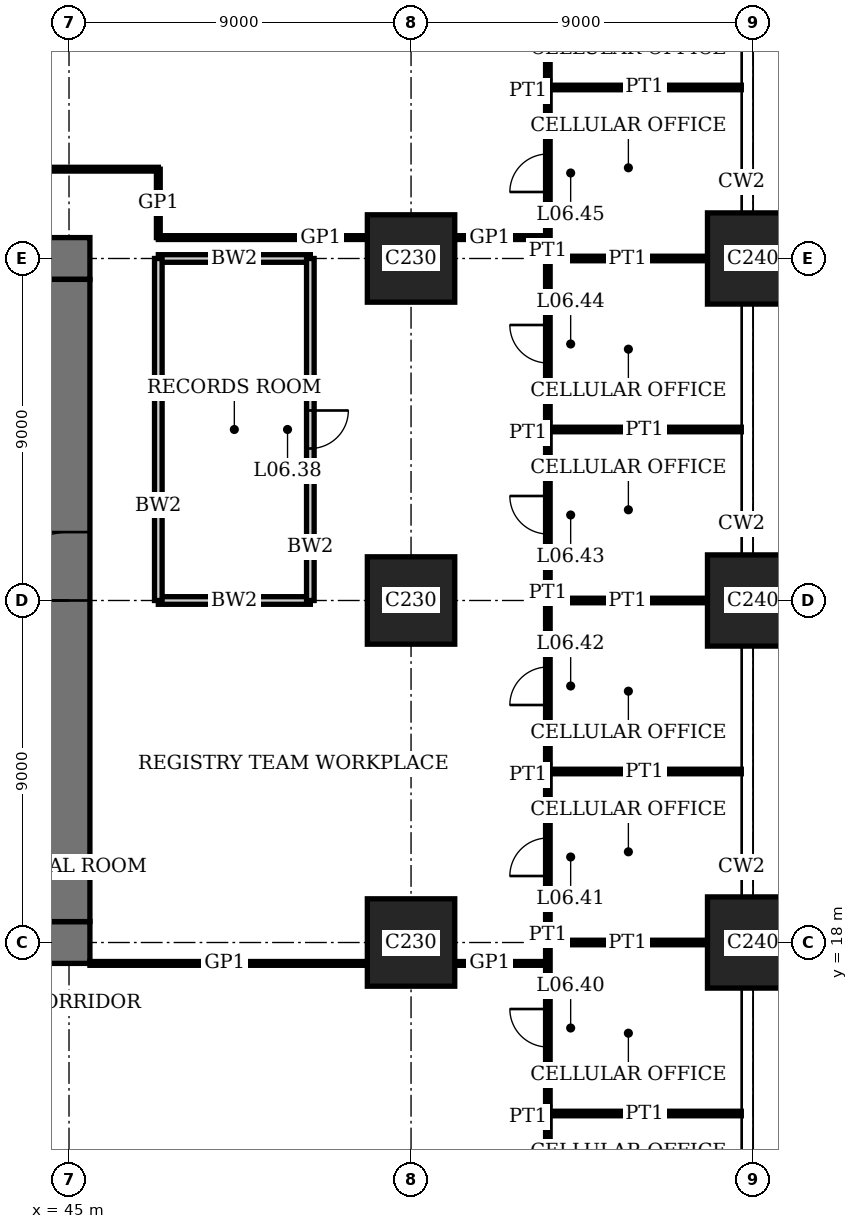
"""IFC4 building model, lengths in metres.
Left out: names, types, materials, properties, quantities, classifications, styles, units other than length and angle.
Written with IfcOpenShell. Run it as: python <this file> out.ifc"""

import sys

from ifc_helpers import new_model, si_unit, direction, frame, frame_2d, origin, origin_2d, place, context, subcontext, project, spatial, rectangle, extrude, element, fill, save


model = new_model("IFC4")
c1 = context("Model", 3, precision=1e-05, world=origin(), true_north=direction((0.0, 1.0)))
c2 = subcontext(c1, "Body", "Model", "MODEL_VIEW")
j1 = project(units=[si_unit("LENGTHUNIT", "METRE"), si_unit("PLANEANGLEUNIT", "RADIAN")], contexts=[c1])
p1 = place(None, origin())
s1 = spatial("IfcSite", under=j1, at=p1, CompositionType="ELEMENT")
p2 = place(p1, origin())
s2 = spatial("IfcBuilding", under=s1, at=p2, CompositionType="ELEMENT")
p3 = place(p2, frame((0.0, 0.0, 27.8)))
s3 = spatial("IfcBuildingStorey", under=s2, at=p3, CompositionType="ELEMENT", Elevation=27.8)
for number, where, z_axis, x_axis in (
    (1, (54.0, 18.0, 0.0), (0.0, 0.0, 1.0), (1.0, 0.0, 0.0)),
    (2, (54.0, 27.0, 0.0), (0.0, 0.0, 1.0), (1.0, 0.0, 0.0)),
    (3, (54.0, 36.0, 0.0), (0.0, 0.0, 1.0), (1.0, 0.0, 0.0)),
):
    element("IfcColumn", number, at=place(p3, frame(where, z_axis=z_axis, x_axis=x_axis)), inside=s3, PredefinedType="COLUMN", context=c2, shape_type="SweptSolid", body=[
        extrude(rectangle(XDim=2.3, YDim=2.3, at=origin_2d()), origin(), (0.0, 0.0, 1.0), 4.0),
    ])
for number, where, z_axis, x_axis in (
    (4, (63.0, 18.0, 0.0), (0.0, 0.0, 1.0), (1.0, 0.0, 0.0)),
    (5, (63.0, 27.0, 0.0), (0.0, 0.0, 1.0), (1.0, 0.0, 0.0)),
    (6, (63.0, 36.0, 0.0), (0.0, 0.0, 1.0), (1.0, 0.0, 0.0)),
):
    element("IfcColumn", number, at=place(p3, frame(where, z_axis=z_axis, x_axis=x_axis)), inside=s3, PredefinedType="COLUMN", context=c2, shape_type="SweptSolid", body=[
        extrude(rectangle(XDim=2.4, YDim=2.4, at=origin_2d()), origin(), (0.0, 0.0, 1.0), 4.0),
    ])
p4 = place(p3, frame((17.45, 18.0, 0.0), z_axis=(0.0, 0.0, 1.0), x_axis=(1.0, 0.0, 0.0)))
e7 = element("IfcWall", 7, at=p4, inside=s3, PredefinedType="SHEAR", context=c2, shape_type="SweptSolid", body=[
    extrude(rectangle(XDim=28.1, YDim=1.1, at=frame_2d((14.05, 0.0))), origin(), (0.0, 0.0, 1.0), 4.0),
])
p5 = place(p4, frame((11.55, 0.0, 0.0)))
e8 = element("IfcOpeningElement", 8, at=p5, cuts=e7, PredefinedType="OPENING", context=c2, shape_type="SweptSolid", body=[
    extrude(rectangle(XDim=1.0, YDim=2.4, at=frame_2d((0.5, 1.2))), frame((0.0, 0.56, 0.0), z_axis=(0.0, -1.0, 0.0), x_axis=(1.0, 0.0, 0.0)), (0.0, 0.0, 1.0), 1.12),
])
p6 = place(p4, frame((16.55, 0.0, 0.0)))
e9 = element("IfcOpeningElement", 9, at=p6, cuts=e7, PredefinedType="OPENING", context=c2, shape_type="SweptSolid", body=[
    extrude(rectangle(XDim=1.0, YDim=2.4, at=frame_2d((0.5, 1.2))), frame((0.0, 0.56, 0.0), z_axis=(0.0, -1.0, 0.0), x_axis=(1.0, 0.0, 0.0)), (0.0, 0.0, 1.0), 1.12),
])
p7 = place(p4, frame((20.0, 0.0, 0.0)))
e10 = element("IfcOpeningElement", 10, at=p7, cuts=e7, PredefinedType="OPENING", context=c2, shape_type="SweptSolid", body=[
    extrude(rectangle(XDim=1.1, YDim=2.4, at=frame_2d((0.55, 1.2))), frame((0.0, 0.56, 0.0), z_axis=(0.0, -1.0, 0.0), x_axis=(1.0, 0.0, 0.0)), (0.0, 0.0, 1.0), 1.12),
])
p8 = place(p4, frame((24.05, 0.0, 0.0)))
e11 = element("IfcOpeningElement", 11, at=p8, cuts=e7, PredefinedType="OPENING", context=c2, shape_type="SweptSolid", body=[
    extrude(rectangle(XDim=1.0, YDim=2.4, at=frame_2d((0.5, 1.2))), frame((0.0, 0.56, 0.0), z_axis=(0.0, -1.0, 0.0), x_axis=(1.0, 0.0, 0.0)), (0.0, 0.0, 1.0), 1.12),
])
p9 = place(p3, frame((45.55, 36.0, 0.0), z_axis=(0.0, 0.0, 1.0), x_axis=(-1.0, 0.0, 0.0)))
e12 = element("IfcWall", 12, at=p9, inside=s3, PredefinedType="SHEAR", context=c2, shape_type="SweptSolid", body=[
    extrude(rectangle(XDim=28.1, YDim=1.1, at=frame_2d((14.05, 0.0))), origin(), (0.0, 0.0, 1.0), 4.0),
])
p10 = place(p9, frame((11.55, 0.0, 0.0)))
e13 = element("IfcOpeningElement", 13, at=p10, cuts=e12, PredefinedType="OPENING", context=c2, shape_type="SweptSolid", body=[
    extrude(rectangle(XDim=1.0, YDim=2.4, at=frame_2d((0.5, 1.2))), frame((0.0, 0.56, 0.0), z_axis=(0.0, -1.0, 0.0), x_axis=(1.0, 0.0, 0.0)), (0.0, 0.0, 1.0), 1.12),
])
p11 = place(p9, frame((16.55, 0.0, 0.0)))
e14 = element("IfcOpeningElement", 14, at=p11, cuts=e12, PredefinedType="OPENING", context=c2, shape_type="SweptSolid", body=[
    extrude(rectangle(XDim=1.0, YDim=2.4, at=frame_2d((0.5, 1.2))), frame((0.0, 0.56, 0.0), z_axis=(0.0, -1.0, 0.0), x_axis=(1.0, 0.0, 0.0)), (0.0, 0.0, 1.0), 1.12),
])
p12 = place(p9, frame((20.0, 0.0, 0.0)))
e15 = element("IfcOpeningElement", 15, at=p12, cuts=e12, PredefinedType="OPENING", context=c2, shape_type="SweptSolid", body=[
    extrude(rectangle(XDim=1.1, YDim=2.4, at=frame_2d((0.55, 1.2))), frame((0.0, 0.56, 0.0), z_axis=(0.0, -1.0, 0.0), x_axis=(1.0, 0.0, 0.0)), (0.0, 0.0, 1.0), 1.12),
])
p13 = place(p9, frame((24.05, 0.0, 0.0)))
e16 = element("IfcOpeningElement", 16, at=p13, cuts=e12, PredefinedType="OPENING", context=c2, shape_type="SweptSolid", body=[
    extrude(rectangle(XDim=1.0, YDim=2.4, at=frame_2d((0.5, 1.2))), frame((0.0, 0.56, 0.0), z_axis=(0.0, -1.0, 0.0), x_axis=(1.0, 0.0, 0.0)), (0.0, 0.0, 1.0), 1.12),
])
p14 = place(p3, frame((45.0, 18.55, 0.0), z_axis=(0.0, 0.0, 1.0), x_axis=(0.0, 1.0, 0.0)))
e17 = element("IfcWall", 17, at=p14, inside=s3, PredefinedType="SHEAR", context=c2, shape_type="SweptSolid", body=[
    extrude(rectangle(XDim=16.9, YDim=1.1, at=frame_2d((8.45, 0.0))), origin(), (0.0, 0.0, 1.0), 4.0),
])
p15 = place(p14, frame((8.45, 0.0, 0.0)))
e18 = element("IfcOpeningElement", 18, at=p15, cuts=e17, PredefinedType="OPENING", context=c2, shape_type="SweptSolid", body=[
    extrude(rectangle(XDim=1.8, YDim=2.4, at=frame_2d((0.9, 1.2))), frame((0.0, 0.56, 0.0), z_axis=(0.0, -1.0, 0.0), x_axis=(1.0, 0.0, 0.0)), (0.0, 0.0, 1.0), 1.12),
])
p16 = place(p3, frame((57.6, 13.5, 0.0), z_axis=(0.0, 0.0, 1.0), x_axis=(1.0, 0.0, 0.0)))
e19 = element("IfcWall", 19, at=p16, inside=s3, PredefinedType="PARTITIONING", context=c2, shape_type="SweptSolid", body=[
    extrude(rectangle(XDim=5.09, YDim=0.12, at=frame_2d((2.545, 0.0))), origin(), (0.0, 0.0, 1.0), 3.1),
])
p17 = place(p3, frame((45.55, 17.45, 0.0), z_axis=(0.0, 0.0, 1.0), x_axis=(1.0, 0.0, 0.0)))
e20 = element("IfcWall", 20, at=p17, inside=s3, PredefinedType="PARTITIONING", context=c2, shape_type="SweptSolid", body=[
    extrude(rectangle(XDim=7.3, YDim=0.1, at=frame_2d((3.65, 0.0))), origin(), (0.0, 0.0, 1.0), 3.75),
])
p18 = place(p3, frame((55.15, 17.45, 0.0), z_axis=(0.0, 0.0, 1.0), x_axis=(1.0, 0.0, 0.0)))
e21 = element("IfcWall", 21, at=p18, inside=s3, PredefinedType="PARTITIONING", context=c2, shape_type="SweptSolid", body=[
    extrude(rectangle(XDim=2.46, YDim=0.1, at=frame_2d((1.23, 0.0))), origin(), (0.0, 0.0, 1.0), 3.75),
])
p19 = place(p3, frame((57.6, 18.0, 0.0), z_axis=(0.0, 0.0, 1.0), x_axis=(1.0, 0.0, 0.0)))
e22 = element("IfcWall", 22, at=p19, inside=s3, PredefinedType="PARTITIONING", context=c2, shape_type="SweptSolid", body=[
    extrude(rectangle(XDim=4.2, YDim=0.12, at=frame_2d((2.1, 0.0))), origin(), (0.0, 0.0, 1.0), 3.05),
])
p20 = place(p3, frame((57.6, 22.5, 0.0), z_axis=(0.0, 0.0, 1.0), x_axis=(1.0, 0.0, 0.0)))
e23 = element("IfcWall", 23, at=p20, inside=s3, PredefinedType="PARTITIONING", context=c2, shape_type="SweptSolid", body=[
    extrude(rectangle(XDim=5.09, YDim=0.12, at=frame_2d((2.545, 0.0))), origin(), (0.0, 0.0, 1.0), 3.1),
])
p21 = place(p3, frame((47.35, 27.0, 0.0), z_axis=(0.0, 0.0, 1.0), x_axis=(1.0, 0.0, 0.0)))
e24 = element("IfcWall", 24, at=p21, inside=s3, PredefinedType="SOLIDWALL", context=c2, shape_type="SweptSolid", body=[
    extrude(rectangle(XDim=4.0, YDim=0.2, at=frame_2d((2.0, 0.0))), origin(), (0.0, 0.0, 1.0), 3.05),
])
p22 = place(p3, frame((57.6, 27.0, 0.0), z_axis=(0.0, 0.0, 1.0), x_axis=(1.0, 0.0, 0.0)))
e25 = element("IfcWall", 25, at=p22, inside=s3, PredefinedType="PARTITIONING", context=c2, shape_type="SweptSolid", body=[
    extrude(rectangle(XDim=4.2, YDim=0.12, at=frame_2d((2.1, 0.0))), origin(), (0.0, 0.0, 1.0), 3.05),
])
p23 = place(p3, frame((57.6, 31.5, 0.0), z_axis=(0.0, 0.0, 1.0), x_axis=(1.0, 0.0, 0.0)))
e26 = element("IfcWall", 26, at=p23, inside=s3, PredefinedType="PARTITIONING", context=c2, shape_type="SweptSolid", body=[
    extrude(rectangle(XDim=5.09, YDim=0.12, at=frame_2d((2.545, 0.0))), origin(), (0.0, 0.0, 1.0), 3.1),
])
p24 = place(p3, frame((47.35, 36.0, 0.0), z_axis=(0.0, 0.0, 1.0), x_axis=(1.0, 0.0, 0.0)))
e27 = element("IfcWall", 27, at=p24, inside=s3, PredefinedType="SOLIDWALL", context=c2, shape_type="SweptSolid", body=[
    extrude(rectangle(XDim=4.0, YDim=0.2, at=frame_2d((2.0, 0.0))), origin(), (0.0, 0.0, 1.0), 3.05),
])
p25 = place(p3, frame((57.6, 36.0, 0.0), z_axis=(0.0, 0.0, 1.0), x_axis=(1.0, 0.0, 0.0)))
e28 = element("IfcWall", 28, at=p25, inside=s3, PredefinedType="PARTITIONING", context=c2, shape_type="SweptSolid", body=[
    extrude(rectangle(XDim=4.2, YDim=0.12, at=frame_2d((2.1, 0.0))), origin(), (0.0, 0.0, 1.0), 3.05),
])
p26 = place(p3, frame((47.35, 36.55, 0.0), z_axis=(0.0, 0.0, 1.0), x_axis=(1.0, 0.0, 0.0)))
e29 = element("IfcWall", 29, at=p26, inside=s3, PredefinedType="PARTITIONING", context=c2, shape_type="SweptSolid", body=[
    extrude(rectangle(XDim=5.5, YDim=0.1, at=frame_2d((2.75, 0.0))), origin(), (0.0, 0.0, 1.0), 3.75),
])
p27 = place(p3, frame((55.15, 36.55, 0.0), z_axis=(0.0, 0.0, 1.0), x_axis=(1.0, 0.0, 0.0)))
e30 = element("IfcWall", 30, at=p27, inside=s3, PredefinedType="PARTITIONING", context=c2, shape_type="SweptSolid", body=[
    extrude(rectangle(XDim=2.46, YDim=0.1, at=frame_2d((1.23, 0.0))), origin(), (0.0, 0.0, 1.0), 3.75),
])
p28 = place(p3, frame((15.65, 38.35, 0.0), z_axis=(0.0, 0.0, 1.0), x_axis=(1.0, 0.0, 0.0)))
e31 = element("IfcWall", 31, at=p28, inside=s3, PredefinedType="PARTITIONING", context=c2, shape_type="SweptSolid", body=[
    extrude(rectangle(XDim=31.7, YDim=0.1, at=frame_2d((15.85, 0.0))), origin(), (0.0, 0.0, 1.0), 3.75),
])
p29 = place(p28, frame((15.35, 0.0, 0.0)))
e32 = element("IfcOpeningElement", 32, at=p29, cuts=e31, PredefinedType="OPENING", context=c2, shape_type="SweptSolid", body=[
    extrude(rectangle(XDim=1.0, YDim=2.4, at=frame_2d((0.5, 1.2))), frame((0.0, 0.06, 0.0), z_axis=(0.0, -1.0, 0.0), x_axis=(1.0, 0.0, 0.0)), (0.0, 0.0, 1.0), 0.12),
])
p30 = place(p3, frame((57.6, 40.5, 0.0), z_axis=(0.0, 0.0, 1.0), x_axis=(1.0, 0.0, 0.0)))
e33 = element("IfcWall", 33, at=p30, inside=s3, PredefinedType="PARTITIONING", context=c2, shape_type="SweptSolid", body=[
    extrude(rectangle(XDim=5.09, YDim=0.12, at=frame_2d((2.545, 0.0))), origin(), (0.0, 0.0, 1.0), 3.1),
])
p31 = place(p3, frame((47.35, 27.0, 0.0), z_axis=(0.0, 0.0, 1.0), x_axis=(0.0, 1.0, 0.0)))
e34 = element("IfcWall", 34, at=p31, inside=s3, PredefinedType="SOLIDWALL", context=c2, shape_type="SweptSolid", body=[
    extrude(rectangle(XDim=9.0, YDim=0.2, at=frame_2d((4.5, 0.0))), origin(), (0.0, 0.0, 1.0), 3.75),
])
p32 = place(p3, frame((47.35, 36.55, 0.0), z_axis=(0.0, 0.0, 1.0), x_axis=(0.0, 1.0, 0.0)))
e35 = element("IfcWall", 35, at=p32, inside=s3, PredefinedType="PARTITIONING", context=c2, shape_type="SweptSolid", body=[
    extrude(rectangle(XDim=1.8, YDim=0.1, at=frame_2d((0.9, 0.0))), origin(), (0.0, 0.0, 1.0), 3.75),
])
p33 = place(p3, frame((51.35, 27.0, 0.0), z_axis=(0.0, 0.0, 1.0), x_axis=(0.0, 1.0, 0.0)))
e36 = element("IfcWall", 36, at=p33, inside=s3, PredefinedType="SOLIDWALL", context=c2, shape_type="SweptSolid", body=[
    extrude(rectangle(XDim=9.0, YDim=0.2, at=frame_2d((4.5, 0.0))), origin(), (0.0, 0.0, 1.0), 3.75),
])
p34 = place(p33, frame((4.0, 0.0, 0.0)))
e37 = element("IfcOpeningElement", 37, at=p34, cuts=e36, PredefinedType="OPENING", context=c2, shape_type="SweptSolid", body=[
    extrude(rectangle(XDim=1.0, YDim=2.4, at=frame_2d((0.5, 1.2))), frame((0.0, 0.11, 0.0), z_axis=(0.0, -1.0, 0.0), x_axis=(1.0, 0.0, 0.0)), (0.0, 0.0, 1.0), 0.22),
])
p35 = place(p3, frame((57.6, 9.0, 0.0), z_axis=(0.0, 0.0, 1.0), x_axis=(0.0, 1.0, 0.0)))
e38 = element("IfcWall", 38, at=p35, inside=s3, PredefinedType="PARTITIONING", context=c2, shape_type="SweptSolid", body=[
    extrude(rectangle(XDim=4.5, YDim=0.12, at=frame_2d((2.25, 0.0))), origin(), (0.0, 0.0, 1.0), 3.75),
])
p36 = place(p35, frame((1.75, 0.0, 0.0)))
e39 = element("IfcOpeningElement", 39, at=p36, cuts=e38, PredefinedType="OPENING", context=c2, shape_type="SweptSolid", body=[
    extrude(rectangle(XDim=1.0, YDim=2.4, at=frame_2d((0.5, 1.2))), frame((0.0, 0.07, 0.0), z_axis=(0.0, -1.0, 0.0), x_axis=(1.0, 0.0, 0.0)), (0.0, 0.0, 1.0), 0.14),
])
p37 = place(p3, frame((57.6, 13.5, 0.0), z_axis=(0.0, 0.0, 1.0), x_axis=(0.0, 1.0, 0.0)))
e40 = element("IfcWall", 40, at=p37, inside=s3, PredefinedType="PARTITIONING", context=c2, shape_type="SweptSolid", body=[
    extrude(rectangle(XDim=4.5, YDim=0.12, at=frame_2d((2.25, 0.0))), origin(), (0.0, 0.0, 1.0), 3.75),
])
p38 = place(p37, frame((1.75, 0.0, 0.0)))
e41 = element("IfcOpeningElement", 41, at=p38, cuts=e40, PredefinedType="OPENING", context=c2, shape_type="SweptSolid", body=[
    extrude(rectangle(XDim=1.0, YDim=2.4, at=frame_2d((0.5, 1.2))), frame((0.0, 0.07, 0.0), z_axis=(0.0, -1.0, 0.0), x_axis=(1.0, 0.0, 0.0)), (0.0, 0.0, 1.0), 0.14),
])
p39 = place(p3, frame((57.6, 18.0, 0.0), z_axis=(0.0, 0.0, 1.0), x_axis=(0.0, 1.0, 0.0)))
e42 = element("IfcWall", 42, at=p39, inside=s3, PredefinedType="PARTITIONING", context=c2, shape_type="SweptSolid", body=[
    extrude(rectangle(XDim=4.5, YDim=0.12, at=frame_2d((2.25, 0.0))), origin(), (0.0, 0.0, 1.0), 3.75),
])
p40 = place(p39, frame((1.75, 0.0, 0.0)))
e43 = element("IfcOpeningElement", 43, at=p40, cuts=e42, PredefinedType="OPENING", context=c2, shape_type="SweptSolid", body=[
    extrude(rectangle(XDim=1.0, YDim=2.4, at=frame_2d((0.5, 1.2))), frame((0.0, 0.07, 0.0), z_axis=(0.0, -1.0, 0.0), x_axis=(1.0, 0.0, 0.0)), (0.0, 0.0, 1.0), 0.14),
])
p41 = place(p3, frame((57.6, 22.5, 0.0), z_axis=(0.0, 0.0, 1.0), x_axis=(0.0, 1.0, 0.0)))
e44 = element("IfcWall", 44, at=p41, inside=s3, PredefinedType="PARTITIONING", context=c2, shape_type="SweptSolid", body=[
    extrude(rectangle(XDim=4.5, YDim=0.12, at=frame_2d((2.25, 0.0))), origin(), (0.0, 0.0, 1.0), 3.75),
])
p42 = place(p41, frame((1.75, 0.0, 0.0)))
e45 = element("IfcOpeningElement", 45, at=p42, cuts=e44, PredefinedType="OPENING", context=c2, shape_type="SweptSolid", body=[
    extrude(rectangle(XDim=1.0, YDim=2.4, at=frame_2d((0.5, 1.2))), frame((0.0, 0.07, 0.0), z_axis=(0.0, -1.0, 0.0), x_axis=(1.0, 0.0, 0.0)), (0.0, 0.0, 1.0), 0.14),
])
p43 = place(p3, frame((57.6, 27.0, 0.0), z_axis=(0.0, 0.0, 1.0), x_axis=(0.0, 1.0, 0.0)))
e46 = element("IfcWall", 46, at=p43, inside=s3, PredefinedType="PARTITIONING", context=c2, shape_type="SweptSolid", body=[
    extrude(rectangle(XDim=4.5, YDim=0.12, at=frame_2d((2.25, 0.0))), origin(), (0.0, 0.0, 1.0), 3.75),
])
p44 = place(p43, frame((1.75, 0.0, 0.0)))
e47 = element("IfcOpeningElement", 47, at=p44, cuts=e46, PredefinedType="OPENING", context=c2, shape_type="SweptSolid", body=[
    extrude(rectangle(XDim=1.0, YDim=2.4, at=frame_2d((0.5, 1.2))), frame((0.0, 0.07, 0.0), z_axis=(0.0, -1.0, 0.0), x_axis=(1.0, 0.0, 0.0)), (0.0, 0.0, 1.0), 0.14),
])
p45 = place(p3, frame((57.6, 31.5, 0.0), z_axis=(0.0, 0.0, 1.0), x_axis=(0.0, 1.0, 0.0)))
e48 = element("IfcWall", 48, at=p45, inside=s3, PredefinedType="PARTITIONING", context=c2, shape_type="SweptSolid", body=[
    extrude(rectangle(XDim=4.5, YDim=0.12, at=frame_2d((2.25, 0.0))), origin(), (0.0, 0.0, 1.0), 3.75),
])
p46 = place(p45, frame((1.75, 0.0, 0.0)))
e49 = element("IfcOpeningElement", 49, at=p46, cuts=e48, PredefinedType="OPENING", context=c2, shape_type="SweptSolid", body=[
    extrude(rectangle(XDim=1.0, YDim=2.4, at=frame_2d((0.5, 1.2))), frame((0.0, 0.07, 0.0), z_axis=(0.0, -1.0, 0.0), x_axis=(1.0, 0.0, 0.0)), (0.0, 0.0, 1.0), 0.14),
])
p47 = place(p3, frame((57.6, 36.0, 0.0), z_axis=(0.0, 0.0, 1.0), x_axis=(0.0, 1.0, 0.0)))
e50 = element("IfcWall", 50, at=p47, inside=s3, PredefinedType="PARTITIONING", context=c2, shape_type="SweptSolid", body=[
    extrude(rectangle(XDim=4.5, YDim=0.12, at=frame_2d((2.25, 0.0))), origin(), (0.0, 0.0, 1.0), 3.75),
])
p48 = place(p47, frame((1.75, 0.0, 0.0)))
e51 = element("IfcOpeningElement", 51, at=p48, cuts=e50, PredefinedType="OPENING", context=c2, shape_type="SweptSolid", body=[
    extrude(rectangle(XDim=1.0, YDim=2.4, at=frame_2d((0.5, 1.2))), frame((0.0, 0.07, 0.0), z_axis=(0.0, -1.0, 0.0), x_axis=(1.0, 0.0, 0.0)), (0.0, 0.0, 1.0), 0.14),
])
p49 = place(p3, frame((57.6, 40.5, 0.0), z_axis=(0.0, 0.0, 1.0), x_axis=(0.0, 1.0, 0.0)))
e52 = element("IfcWall", 52, at=p49, inside=s3, PredefinedType="PARTITIONING", context=c2, shape_type="SweptSolid", body=[
    extrude(rectangle(XDim=4.5, YDim=0.12, at=frame_2d((2.25, 0.0))), origin(), (0.0, 0.0, 1.0), 3.75),
])
p50 = place(p49, frame((1.75, 0.0, 0.0)))
e53 = element("IfcOpeningElement", 53, at=p50, cuts=e52, PredefinedType="OPENING", context=c2, shape_type="SweptSolid", body=[
    extrude(rectangle(XDim=1.0, YDim=2.4, at=frame_2d((0.5, 1.2))), frame((0.0, 0.07, 0.0), z_axis=(0.0, -1.0, 0.0), x_axis=(1.0, 0.0, 0.0)), (0.0, 0.0, 1.0), 0.14),
])
p51 = place(p15, origin())
e54 = element("IfcDoor", 54, at=p51, inside=s3, OperationType="DOUBLE_DOOR_DOUBLE_SWING", PredefinedType="DOOR", context=c2, shape_type="SweptSolid", body=[
    extrude(rectangle(XDim=1.8, YDim=2.4, at=frame_2d((0.9, 1.2))), frame((0.0, 0.03, 0.0), z_axis=(0.0, -1.0, 0.0), x_axis=(1.0, 0.0, 0.0)), (0.0, 0.0, 1.0), 0.06),
    extrude(rectangle(XDim=0.04, YDim=2.4, at=frame_2d((0.02, 1.2))), frame((0.0, 0.55, 0.0), z_axis=(0.0, -1.0, 0.0), x_axis=(1.0, 0.0, 0.0)), (0.0, 0.0, 1.0), 1.1),
    extrude(rectangle(XDim=0.04, YDim=2.4, at=frame_2d((1.78, 1.2))), frame((0.0, 0.55, 0.0), z_axis=(0.0, -1.0, 0.0), x_axis=(1.0, 0.0, 0.0)), (0.0, 0.0, 1.0), 1.1),
    extrude(rectangle(XDim=1.8, YDim=0.04, at=frame_2d((0.9, 2.38))), frame((0.0, 0.55, 0.0), z_axis=(0.0, -1.0, 0.0), x_axis=(1.0, 0.0, 0.0)), (0.0, 0.0, 1.0), 1.1),
])
fill(e18, e54)
p52 = place(p34, origin())
e55 = element("IfcDoor", 55, at=p52, inside=s3, OperationType="SINGLE_SWING_RIGHT", PredefinedType="DOOR", context=c2, shape_type="SweptSolid", body=[
    extrude(rectangle(XDim=1.0, YDim=2.4, at=frame_2d((0.5, 1.2))), frame((0.0, 0.035, 0.0), z_axis=(0.0, -1.0, 0.0), x_axis=(1.0, 0.0, 0.0)), (0.0, 0.0, 1.0), 0.07),
])
fill(e37, e55)
p53 = place(p38, origin())
e56 = element("IfcDoor", 56, at=p53, inside=s3, OperationType="SINGLE_SWING_LEFT", PredefinedType="DOOR", context=c2, shape_type="SweptSolid", body=[
    extrude(rectangle(XDim=1.0, YDim=2.4, at=frame_2d((0.5, 1.2))), frame((0.0, 0.025, 0.0), z_axis=(0.0, -1.0, 0.0), x_axis=(1.0, 0.0, 0.0)), (0.0, 0.0, 1.0), 0.05),
])
fill(e41, e56)
p54 = place(p40, origin())
e57 = element("IfcDoor", 57, at=p54, inside=s3, OperationType="SINGLE_SWING_RIGHT", PredefinedType="DOOR", context=c2, shape_type="SweptSolid", body=[
    extrude(rectangle(XDim=1.0, YDim=2.4, at=frame_2d((0.5, 1.2))), frame((0.0, 0.025, 0.0), z_axis=(0.0, -1.0, 0.0), x_axis=(1.0, 0.0, 0.0)), (0.0, 0.0, 1.0), 0.05),
])
fill(e43, e57)
p55 = place(p42, origin())
e58 = element("IfcDoor", 58, at=p55, inside=s3, OperationType="SINGLE_SWING_RIGHT", PredefinedType="DOOR", context=c2, shape_type="SweptSolid", body=[
    extrude(rectangle(XDim=1.0, YDim=2.4, at=frame_2d((0.5, 1.2))), frame((0.0, 0.025, 0.0), z_axis=(0.0, -1.0, 0.0), x_axis=(1.0, 0.0, 0.0)), (0.0, 0.0, 1.0), 0.05),
])
fill(e45, e58)
p56 = place(p44, origin())
e59 = element("IfcDoor", 59, at=p56, inside=s3, OperationType="SINGLE_SWING_LEFT", PredefinedType="DOOR", context=c2, shape_type="SweptSolid", body=[
    extrude(rectangle(XDim=1.0, YDim=2.4, at=frame_2d((0.5, 1.2))), frame((0.0, 0.025, 0.0), z_axis=(0.0, -1.0, 0.0), x_axis=(1.0, 0.0, 0.0)), (0.0, 0.0, 1.0), 0.05),
])
fill(e47, e59)
p57 = place(p46, origin())
e60 = element("IfcDoor", 60, at=p57, inside=s3, OperationType="SINGLE_SWING_LEFT", PredefinedType="DOOR", context=c2, shape_type="SweptSolid", body=[
    extrude(rectangle(XDim=1.0, YDim=2.4, at=frame_2d((0.5, 1.2))), frame((0.0, 0.025, 0.0), z_axis=(0.0, -1.0, 0.0), x_axis=(1.0, 0.0, 0.0)), (0.0, 0.0, 1.0), 0.05),
])
fill(e49, e60)
p58 = place(p48, origin())
e61 = element("IfcDoor", 61, at=p58, inside=s3, OperationType="SINGLE_SWING_RIGHT", PredefinedType="DOOR", context=c2, shape_type="SweptSolid", body=[
    extrude(rectangle(XDim=1.0, YDim=2.4, at=frame_2d((0.5, 1.2))), frame((0.0, 0.025, 0.0), z_axis=(0.0, -1.0, 0.0), x_axis=(1.0, 0.0, 0.0)), (0.0, 0.0, 1.0), 0.05),
])
fill(e51, e61)
save(model, sys.argv[1])
